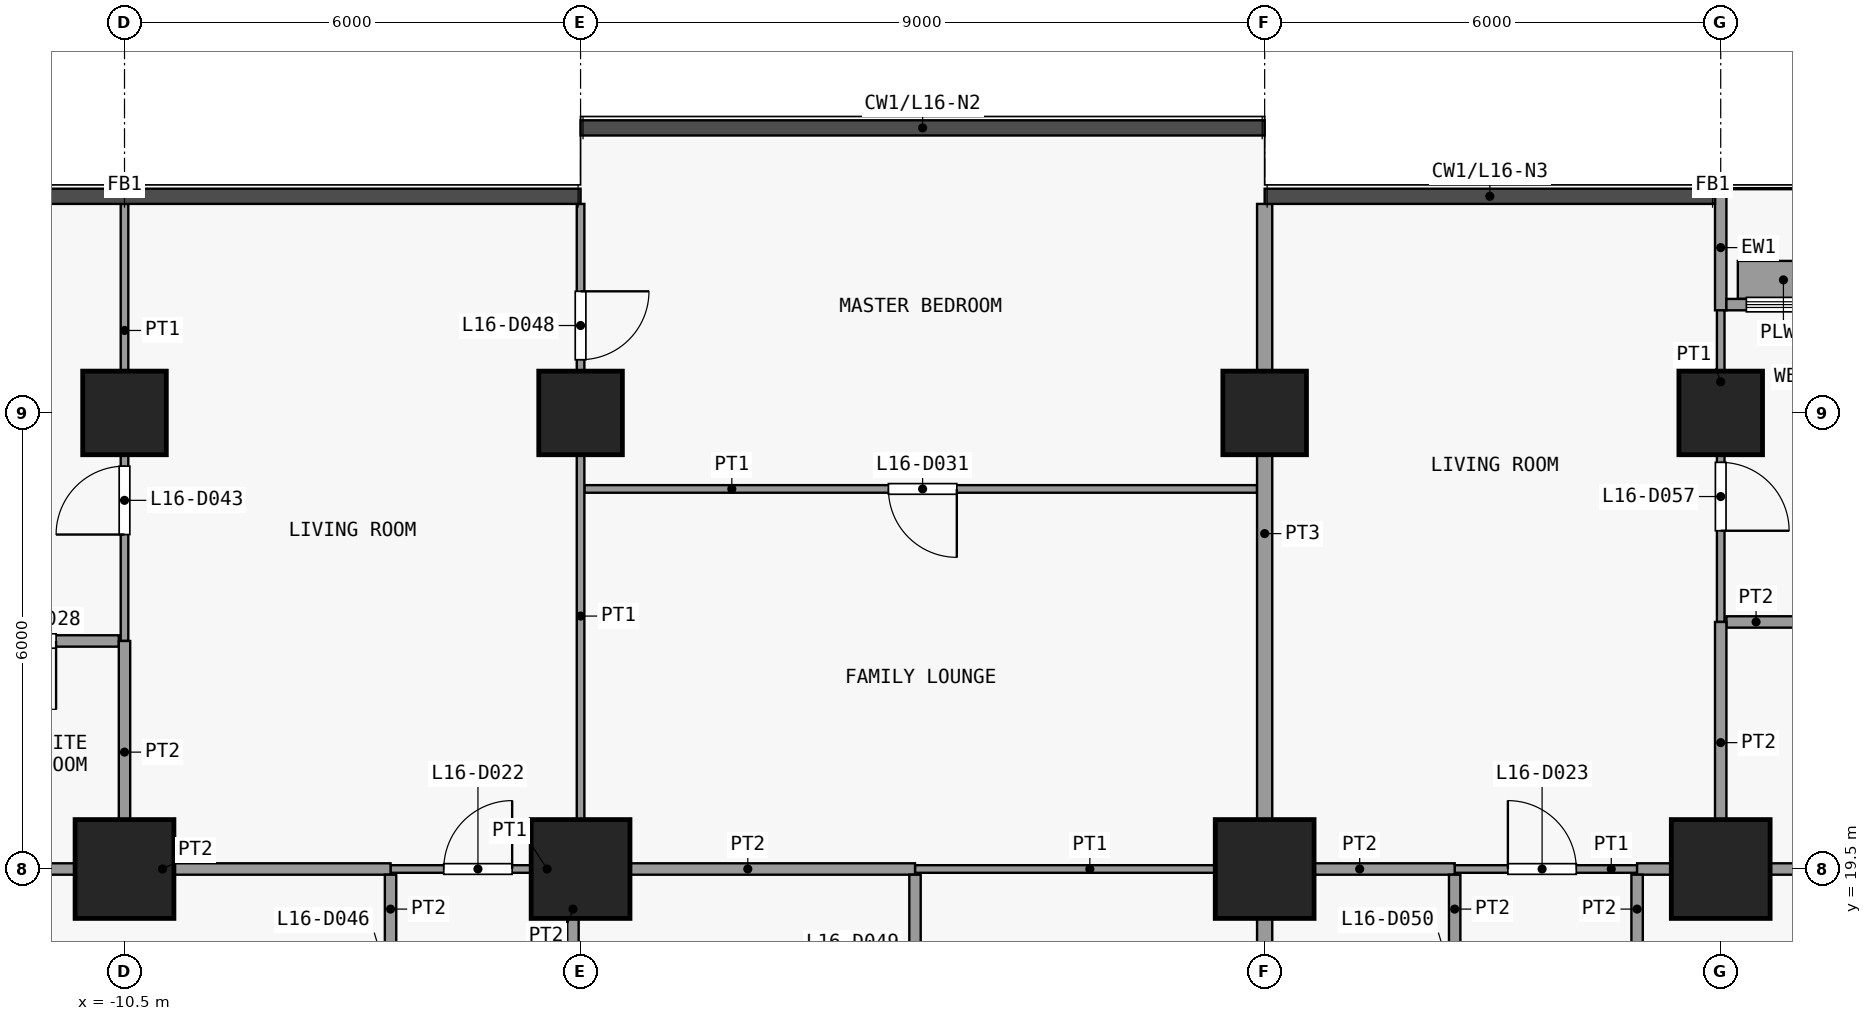
"""IFC4 building model, lengths in metres.
Left out: names, types, materials, properties, quantities, classifications, styles, units other than length and angle.
Written with IfcOpenShell. Run it as: python <this file> out.ifc"""

import sys

from ifc_helpers import new_model, si_unit, direction, frame, frame_2d, origin, origin_2d, place, context, subcontext, project, spatial, rectangle, extrude, element, fill, save


model = new_model("IFC4")
c1 = context("Model", 3, precision=1e-05, world=origin(), true_north=direction((0.0, 1.0)))
c2 = subcontext(c1, "Body", "Model", "MODEL_VIEW")
j1 = project(units=[si_unit("LENGTHUNIT", "METRE"), si_unit("PLANEANGLEUNIT", "RADIAN")], contexts=[c1])
p1 = place(None, origin())
s1 = spatial("IfcSite", under=j1, at=p1, CompositionType="ELEMENT")
p2 = place(p1, origin())
s2 = spatial("IfcBuilding", under=s1, at=p2, CompositionType="ELEMENT")
p3 = place(p2, frame((0.0, 0.0, 68.5)))
s3 = spatial("IfcBuildingStorey", under=s2, at=p3, CompositionType="ELEMENT", Elevation=68.5)
p4 = place(p3, frame((-10.5, 19.5, 0.0), z_axis=(0.0, 0.0, 1.0), x_axis=(1.0, 0.0, 0.0)))
e1 = element("IfcColumn", 1, at=p4, inside=s3, PredefinedType="COLUMN", context=c2, shape_type="SweptSolid", body=[
    extrude(rectangle(XDim=1.3, YDim=1.3, at=origin_2d()), origin(), (0.0, 0.0, 1.0), 3.6),
])
p5 = place(p3, frame((-10.5, 25.5, 0.0), z_axis=(0.0, 0.0, 1.0), x_axis=(1.0, 0.0, 0.0)))
e2 = element("IfcColumn", 2, at=p5, inside=s3, PredefinedType="COLUMN", context=c2, shape_type="SweptSolid", body=[
    extrude(rectangle(XDim=1.1, YDim=1.1, at=origin_2d()), origin(), (0.0, 0.0, 1.0), 3.6),
])
p6 = place(p3, frame((-4.5, 19.5, 0.0), z_axis=(0.0, 0.0, 1.0), x_axis=(1.0, 0.0, 0.0)))
e3 = element("IfcColumn", 3, at=p6, inside=s3, PredefinedType="COLUMN", context=c2, shape_type="SweptSolid", body=[
    extrude(rectangle(XDim=1.3, YDim=1.3, at=origin_2d()), origin(), (0.0, 0.0, 1.0), 3.6),
])
p7 = place(p3, frame((-4.5, 25.5, 0.0), z_axis=(0.0, 0.0, 1.0), x_axis=(1.0, 0.0, 0.0)))
e4 = element("IfcColumn", 4, at=p7, inside=s3, PredefinedType="COLUMN", context=c2, shape_type="SweptSolid", body=[
    extrude(rectangle(XDim=1.1, YDim=1.1, at=origin_2d()), origin(), (0.0, 0.0, 1.0), 3.6),
])
p8 = place(p3, frame((4.5, 19.5, 0.0), z_axis=(0.0, 0.0, 1.0), x_axis=(1.0, 0.0, 0.0)))
e5 = element("IfcColumn", 5, at=p8, inside=s3, PredefinedType="COLUMN", context=c2, shape_type="SweptSolid", body=[
    extrude(rectangle(XDim=1.3, YDim=1.3, at=origin_2d()), origin(), (0.0, 0.0, 1.0), 3.6),
])
p9 = place(p3, frame((4.5, 25.5, 0.0), z_axis=(0.0, 0.0, 1.0), x_axis=(1.0, 0.0, 0.0)))
e6 = element("IfcColumn", 6, at=p9, inside=s3, PredefinedType="COLUMN", context=c2, shape_type="SweptSolid", body=[
    extrude(rectangle(XDim=1.1, YDim=1.1, at=origin_2d()), origin(), (0.0, 0.0, 1.0), 3.6),
])
p10 = place(p3, frame((10.5, 19.5, 0.0), z_axis=(0.0, 0.0, 1.0), x_axis=(1.0, 0.0, 0.0)))
e7 = element("IfcColumn", 7, at=p10, inside=s3, PredefinedType="COLUMN", context=c2, shape_type="SweptSolid", body=[
    extrude(rectangle(XDim=1.3, YDim=1.3, at=origin_2d()), origin(), (0.0, 0.0, 1.0), 3.6),
])
p11 = place(p3, frame((10.5, 25.5, 0.0), z_axis=(0.0, 0.0, 1.0), x_axis=(1.0, 0.0, 0.0)))
e8 = element("IfcColumn", 8, at=p11, inside=s3, PredefinedType="COLUMN", context=c2, shape_type="SweptSolid", body=[
    extrude(rectangle(XDim=1.1, YDim=1.1, at=origin_2d()), origin(), (0.0, 0.0, 1.0), 3.6),
])
p12 = place(p3, frame((10.5, 26.85, 0.0), z_axis=(0.0, 0.0, 1.0), x_axis=(0.0, 1.0, 0.0)))
e9 = element("IfcWall", 9, at=p12, inside=s3, PredefinedType="SOLIDWALL", context=c2, shape_type="SweptSolid", body=[
    extrude(rectangle(XDim=1.65, YDim=0.15, at=frame_2d((0.825, 0.0))), origin(), (0.0, 0.0, 1.0), 3.3),
])
p13 = place(p3, frame((10.575, 26.925, 0.0), z_axis=(0.0, 0.0, 1.0), x_axis=(1.0, 0.0, 0.0)))
e10 = element("IfcWall", 10, at=p13, inside=s3, PredefinedType="SOLIDWALL", context=c2, shape_type="SweptSolid", body=[
    extrude(rectangle(XDim=5.85, YDim=0.15, at=frame_2d((2.925, 0.0))), origin(), (0.0, 0.0, 1.0), 3.3),
])
p14 = place(p13, frame((2.325, 0.0, 0.0)))
e11 = element("IfcOpeningElement", 11, at=p14, cuts=e10, PredefinedType="OPENING", context=c2, shape_type="SweptSolid", body=[
    extrude(rectangle(XDim=1.2, YDim=2.4, at=frame_2d((0.6, 1.2))), frame((0.0, 0.085, 0.0), z_axis=(0.0, -1.0, 0.0), x_axis=(1.0, 0.0, 0.0)), (0.0, 0.0, 1.0), 0.17),
])
p15 = place(p13, frame((0.262, 0.0, 0.9)))
e12 = element("IfcOpeningElement", 12, at=p15, cuts=e10, PredefinedType="OPENING", context=c2, shape_type="SweptSolid", body=[
    extrude(rectangle(XDim=1.8, YDim=2.1, at=frame_2d((0.9, 1.05))), frame((0.0, 0.085, 0.0), z_axis=(0.0, -1.0, 0.0), x_axis=(1.0, 0.0, 0.0)), (0.0, 0.0, 1.0), 0.17),
])
p16 = place(p13, frame((3.788, 0.0, 0.9)))
e13 = element("IfcOpeningElement", 13, at=p16, cuts=e10, PredefinedType="OPENING", context=c2, shape_type="SweptSolid", body=[
    extrude(rectangle(XDim=1.8, YDim=2.1, at=frame_2d((0.9, 1.05))), frame((0.0, 0.085, 0.0), z_axis=(0.0, -1.0, 0.0), x_axis=(1.0, 0.0, 0.0)), (0.0, 0.0, 1.0), 0.17),
])
p17 = place(p3, frame((10.725, 27.25, 0.0), z_axis=(0.0, 0.0, 1.0), x_axis=(1.0, 0.0, 0.0)))
e14 = element("IfcWall", 14, at=p17, inside=s3, PredefinedType="USERDEFINED", context=c2, shape_type="SweptSolid", body=[
    extrude(rectangle(XDim=1.2, YDim=0.5, at=frame_2d((0.6, 0.0))), origin(), (0.0, 0.0, 1.0), 0.9),
])
p18 = place(p3, frame((-7.0, 19.5, 0.0), z_axis=(0.0, 0.0, 1.0), x_axis=(1.0, 0.0, 0.0)))
e15 = element("IfcWall", 15, at=p18, inside=s3, PredefinedType="PARTITIONING", context=c2, shape_type="SweptSolid", body=[
    extrude(rectangle(XDim=2.4, YDim=0.1, at=frame_2d((1.2, 0.0))), origin(), (0.0, 0.0, 1.0), 3.3),
])
p19 = place(p18, frame((0.7, 0.0, 0.0)))
e16 = element("IfcOpeningElement", 16, at=p19, cuts=e15, PredefinedType="OPENING", context=c2, shape_type="SweptSolid", body=[
    extrude(rectangle(XDim=0.9, YDim=2.1, at=frame_2d((0.45, 1.05))), frame((0.0, 0.06, 0.0), z_axis=(0.0, -1.0, 0.0), x_axis=(1.0, 0.0, 0.0)), (0.0, 0.0, 1.0), 0.12),
])
p20 = place(p3, frame((-0.1, 19.5, 0.0), z_axis=(0.0, 0.0, 1.0), x_axis=(1.0, 0.0, 0.0)))
e17 = element("IfcWall", 17, at=p20, inside=s3, PredefinedType="PARTITIONING", context=c2, shape_type="SweptSolid", body=[
    extrude(rectangle(XDim=4.6, YDim=0.1, at=frame_2d((2.3, 0.0))), origin(), (0.0, 0.0, 1.0), 3.3),
])
p21 = place(p3, frame((7.0, 19.5, 0.0), z_axis=(0.0, 0.0, 1.0), x_axis=(1.0, 0.0, 0.0)))
e18 = element("IfcWall", 18, at=p21, inside=s3, PredefinedType="PARTITIONING", context=c2, shape_type="SweptSolid", body=[
    extrude(rectangle(XDim=2.4, YDim=0.1, at=frame_2d((1.2, 0.0))), origin(), (0.0, 0.0, 1.0), 3.3),
])
p22 = place(p21, frame((0.7, 0.0, 0.0)))
e19 = element("IfcOpeningElement", 19, at=p22, cuts=e18, PredefinedType="OPENING", context=c2, shape_type="SweptSolid", body=[
    extrude(rectangle(XDim=0.9, YDim=2.1, at=frame_2d((0.45, 1.05))), frame((0.0, 0.06, 0.0), z_axis=(0.0, -1.0, 0.0), x_axis=(1.0, 0.0, 0.0)), (0.0, 0.0, 1.0), 0.12),
])
p23 = place(p3, frame((-13.0, 19.5, 0.0), z_axis=(0.0, 0.0, 1.0), x_axis=(1.0, 0.0, 0.0)))
e20 = element("IfcWall", 20, at=p23, inside=s3, PredefinedType="PARTITIONING", context=c2, shape_type="SweptSolid", body=[
    extrude(rectangle(XDim=6.0, YDim=0.15, at=frame_2d((3.0, 0.0))), origin(), (0.0, 0.0, 1.0), 3.3),
])
p24 = place(p3, frame((-4.5, 19.5, 0.0), z_axis=(0.0, 0.0, 1.0), x_axis=(1.0, 0.0, 0.0)))
e21 = element("IfcWall", 21, at=p24, inside=s3, PredefinedType="PARTITIONING", context=c2, shape_type="SweptSolid", body=[
    extrude(rectangle(XDim=4.4, YDim=0.15, at=frame_2d((2.2, 0.0))), origin(), (0.0, 0.0, 1.0), 3.3),
])
p25 = place(p3, frame((4.5, 19.5, 0.0), z_axis=(0.0, 0.0, 1.0), x_axis=(1.0, 0.0, 0.0)))
e22 = element("IfcWall", 22, at=p25, inside=s3, PredefinedType="PARTITIONING", context=c2, shape_type="SweptSolid", body=[
    extrude(rectangle(XDim=2.5, YDim=0.15, at=frame_2d((1.25, 0.0))), origin(), (0.0, 0.0, 1.0), 3.3),
])
p26 = place(p3, frame((9.4, 19.5, 0.0), z_axis=(0.0, 0.0, 1.0), x_axis=(1.0, 0.0, 0.0)))
e23 = element("IfcWall", 23, at=p26, inside=s3, PredefinedType="PARTITIONING", context=c2, shape_type="SweptSolid", body=[
    extrude(rectangle(XDim=9.6, YDim=0.15, at=frame_2d((4.8, 0.0))), origin(), (0.0, 0.0, 1.0), 3.3),
])
p27 = place(p3, frame((-13.2, 22.5, 0.0), z_axis=(0.0, 0.0, 1.0), x_axis=(1.0, 0.0, 0.0)))
e24 = element("IfcWall", 24, at=p27, inside=s3, PredefinedType="PARTITIONING", context=c2, shape_type="SweptSolid", body=[
    extrude(rectangle(XDim=2.625, YDim=0.15, at=frame_2d((1.312, 0.0))), origin(), (0.0, 0.0, 1.0), 3.3),
])
p28 = place(p27, frame((0.9, 0.0, 0.0)))
e25 = element("IfcOpeningElement", 25, at=p28, cuts=e24, PredefinedType="OPENING", context=c2, shape_type="SweptSolid", body=[
    extrude(rectangle(XDim=0.9, YDim=2.1, at=frame_2d((0.45, 1.05))), frame((0.0, 0.085, 0.0), z_axis=(0.0, -1.0, 0.0), x_axis=(1.0, 0.0, 0.0)), (0.0, 0.0, 1.0), 0.17),
])
p29 = place(p3, frame((10.575, 22.75, 0.0), z_axis=(0.0, 0.0, 1.0), x_axis=(1.0, 0.0, 0.0)))
e26 = element("IfcWall", 26, at=p29, inside=s3, PredefinedType="PARTITIONING", context=c2, shape_type="SweptSolid", body=[
    extrude(rectangle(XDim=2.625, YDim=0.15, at=frame_2d((1.312, 0.0))), origin(), (0.0, 0.0, 1.0), 3.3),
])
p30 = place(p29, frame((0.9, 0.0, 0.0)))
e27 = element("IfcOpeningElement", 27, at=p30, cuts=e26, PredefinedType="OPENING", context=c2, shape_type="SweptSolid", body=[
    extrude(rectangle(XDim=0.9, YDim=2.1, at=frame_2d((0.45, 1.05))), frame((0.0, 0.085, 0.0), z_axis=(0.0, -1.0, 0.0), x_axis=(1.0, 0.0, 0.0)), (0.0, 0.0, 1.0), 0.17),
])
p31 = place(p3, frame((-4.45, 24.5, 0.0), z_axis=(0.0, 0.0, 1.0), x_axis=(1.0, 0.0, 0.0)))
e28 = element("IfcWall", 28, at=p31, inside=s3, PredefinedType="PARTITIONING", context=c2, shape_type="SweptSolid", body=[
    extrude(rectangle(XDim=8.85, YDim=0.1, at=frame_2d((4.425, 0.0))), origin(), (0.0, 0.0, 1.0), 3.3),
])
p32 = place(p31, frame((4.0, 0.0, 0.0)))
e29 = element("IfcOpeningElement", 29, at=p32, cuts=e28, PredefinedType="OPENING", context=c2, shape_type="SweptSolid", body=[
    extrude(rectangle(XDim=0.9, YDim=2.1, at=frame_2d((0.45, 1.05))), frame((0.0, 0.06, 0.0), z_axis=(0.0, -1.0, 0.0), x_axis=(1.0, 0.0, 0.0)), (0.0, 0.0, 1.0), 0.12),
])
p33 = place(p3, frame((-10.5, 22.5, 0.0), z_axis=(0.0, 0.0, 1.0), x_axis=(0.0, 1.0, 0.0)))
e30 = element("IfcWall", 30, at=p33, inside=s3, PredefinedType="PARTITIONING", context=c2, shape_type="SweptSolid", body=[
    extrude(rectangle(XDim=5.75, YDim=0.1, at=frame_2d((2.875, 0.0))), origin(), (0.0, 0.0, 1.0), 3.3),
])
p34 = place(p33, frame((1.4, 0.0, 0.0)))
e31 = element("IfcOpeningElement", 31, at=p34, cuts=e30, PredefinedType="OPENING", context=c2, shape_type="SweptSolid", body=[
    extrude(rectangle(XDim=0.9, YDim=2.1, at=frame_2d((0.45, 1.05))), frame((0.0, 0.06, 0.0), z_axis=(0.0, -1.0, 0.0), x_axis=(1.0, 0.0, 0.0)), (0.0, 0.0, 1.0), 0.12),
])
p35 = place(p3, frame((-10.5, 19.575, 0.0), z_axis=(0.0, 0.0, 1.0), x_axis=(0.0, 1.0, 0.0)))
e32 = element("IfcWall", 32, at=p35, inside=s3, PredefinedType="PARTITIONING", context=c2, shape_type="SweptSolid", body=[
    extrude(rectangle(XDim=2.925, YDim=0.15, at=frame_2d((1.462, 0.0))), origin(), (0.0, 0.0, 1.0), 3.3),
])
p36 = place(p3, frame((-7.0, 16.6, 0.0), z_axis=(0.0, 0.0, 1.0), x_axis=(0.0, 1.0, 0.0)))
e33 = element("IfcWall", 33, at=p36, inside=s3, PredefinedType="PARTITIONING", context=c2, shape_type="SweptSolid", body=[
    extrude(rectangle(XDim=2.825, YDim=0.15, at=frame_2d((1.413, 0.0))), origin(), (0.0, 0.0, 1.0), 3.3),
])
p37 = place(p36, frame((0.9, 0.0, 0.0)))
e34 = element("IfcOpeningElement", 34, at=p37, cuts=e33, PredefinedType="OPENING", context=c2, shape_type="SweptSolid", body=[
    extrude(rectangle(XDim=0.9, YDim=2.1, at=frame_2d((0.45, 1.05))), frame((0.0, 0.085, 0.0), z_axis=(0.0, -1.0, 0.0), x_axis=(1.0, 0.0, 0.0)), (0.0, 0.0, 1.0), 0.17),
])
p38 = place(p3, frame((-4.6, 16.6, 0.0), z_axis=(0.0, 0.0, 1.0), x_axis=(0.0, 1.0, 0.0)))
e35 = element("IfcWall", 35, at=p38, inside=s3, PredefinedType="PARTITIONING", context=c2, shape_type="SweptSolid", body=[
    extrude(rectangle(XDim=2.825, YDim=0.15, at=frame_2d((1.413, 0.0))), origin(), (0.0, 0.0, 1.0), 3.3),
])
p39 = place(p38, frame((0.9, 0.0, 0.0)))
e36 = element("IfcOpeningElement", 36, at=p39, cuts=e35, PredefinedType="OPENING", context=c2, shape_type="SweptSolid", body=[
    extrude(rectangle(XDim=0.9, YDim=2.1, at=frame_2d((0.45, 1.05))), frame((0.0, 0.085, 0.0), z_axis=(0.0, -1.0, 0.0), x_axis=(1.0, 0.0, 0.0)), (0.0, 0.0, 1.0), 0.17),
])
p40 = place(p3, frame((-4.5, 19.575, 0.0), z_axis=(0.0, 0.0, 1.0), x_axis=(0.0, 1.0, 0.0)))
e37 = element("IfcWall", 37, at=p40, inside=s3, PredefinedType="PARTITIONING", context=c2, shape_type="SweptSolid", body=[
    extrude(rectangle(XDim=8.675, YDim=0.1, at=frame_2d((4.337, 0.0))), origin(), (0.0, 0.0, 1.0), 3.3),
])
p41 = place(p40, frame((6.625, 0.0, 0.0)))
e38 = element("IfcOpeningElement", 38, at=p41, cuts=e37, PredefinedType="OPENING", context=c2, shape_type="SweptSolid", body=[
    extrude(rectangle(XDim=0.9, YDim=2.1, at=frame_2d((0.45, 1.05))), frame((0.0, 0.06, 0.0), z_axis=(0.0, -1.0, 0.0), x_axis=(1.0, 0.0, 0.0)), (0.0, 0.0, 1.0), 0.12),
])
p42 = place(p3, frame((-0.1, 16.6, 0.0), z_axis=(0.0, 0.0, 1.0), x_axis=(0.0, 1.0, 0.0)))
e39 = element("IfcWall", 39, at=p42, inside=s3, PredefinedType="PARTITIONING", context=c2, shape_type="SweptSolid", body=[
    extrude(rectangle(XDim=2.825, YDim=0.15, at=frame_2d((1.413, 0.0))), origin(), (0.0, 0.0, 1.0), 3.3),
])
p43 = place(p42, frame((1.0, 0.0, 0.0)))
e40 = element("IfcOpeningElement", 40, at=p43, cuts=e39, PredefinedType="OPENING", context=c2, shape_type="SweptSolid", body=[
    extrude(rectangle(XDim=0.9, YDim=2.1, at=frame_2d((0.45, 1.05))), frame((0.0, 0.085, 0.0), z_axis=(0.0, -1.0, 0.0), x_axis=(1.0, 0.0, 0.0)), (0.0, 0.0, 1.0), 0.17),
])
p44 = place(p3, frame((4.5, 16.6, 0.0), z_axis=(0.0, 0.0, 1.0), x_axis=(0.0, 1.0, 0.0)))
e41 = element("IfcWall", 41, at=p44, inside=s3, PredefinedType="PARTITIONING", context=c2, shape_type="SweptSolid", body=[
    extrude(rectangle(XDim=2.825, YDim=0.2, at=frame_2d((1.413, 0.0))), origin(), (0.0, 0.0, 1.0), 3.3),
])
p45 = place(p3, frame((4.5, 19.575, 0.0), z_axis=(0.0, 0.0, 1.0), x_axis=(0.0, 1.0, 0.0)))
e42 = element("IfcWall", 42, at=p45, inside=s3, PredefinedType="PARTITIONING", context=c2, shape_type="SweptSolid", body=[
    extrude(rectangle(XDim=8.675, YDim=0.2, at=frame_2d((4.337, 0.0))), origin(), (0.0, 0.0, 1.0), 3.3),
])
p46 = place(p3, frame((7.0, 16.6, 0.0), z_axis=(0.0, 0.0, 1.0), x_axis=(0.0, 1.0, 0.0)))
e43 = element("IfcWall", 43, at=p46, inside=s3, PredefinedType="PARTITIONING", context=c2, shape_type="SweptSolid", body=[
    extrude(rectangle(XDim=2.825, YDim=0.15, at=frame_2d((1.413, 0.0))), origin(), (0.0, 0.0, 1.0), 3.3),
])
p47 = place(p46, frame((0.9, 0.0, 0.0)))
e44 = element("IfcOpeningElement", 44, at=p47, cuts=e43, PredefinedType="OPENING", context=c2, shape_type="SweptSolid", body=[
    extrude(rectangle(XDim=0.9, YDim=2.1, at=frame_2d((0.45, 1.05))), frame((0.0, 0.085, 0.0), z_axis=(0.0, -1.0, 0.0), x_axis=(1.0, 0.0, 0.0)), (0.0, 0.0, 1.0), 0.17),
])
p48 = place(p3, frame((9.4, 16.6, 0.0), z_axis=(0.0, 0.0, 1.0), x_axis=(0.0, 1.0, 0.0)))
e45 = element("IfcWall", 45, at=p48, inside=s3, PredefinedType="PARTITIONING", context=c2, shape_type="SweptSolid", body=[
    extrude(rectangle(XDim=2.825, YDim=0.15, at=frame_2d((1.413, 0.0))), origin(), (0.0, 0.0, 1.0), 3.3),
])
p49 = place(p48, frame((0.9, 0.0, 0.0)))
e46 = element("IfcOpeningElement", 46, at=p49, cuts=e45, PredefinedType="OPENING", context=c2, shape_type="SweptSolid", body=[
    extrude(rectangle(XDim=0.9, YDim=2.1, at=frame_2d((0.45, 1.05))), frame((0.0, 0.085, 0.0), z_axis=(0.0, -1.0, 0.0), x_axis=(1.0, 0.0, 0.0)), (0.0, 0.0, 1.0), 0.17),
])
p50 = place(p3, frame((10.5, 22.75, 0.0), z_axis=(0.0, 0.0, 1.0), x_axis=(0.0, 1.0, 0.0)))
e47 = element("IfcWall", 47, at=p50, inside=s3, PredefinedType="PARTITIONING", context=c2, shape_type="SweptSolid", body=[
    extrude(rectangle(XDim=4.1, YDim=0.1, at=frame_2d((2.05, 0.0))), origin(), (0.0, 0.0, 1.0), 3.3),
])
p51 = place(p50, frame((1.2, 0.0, 0.0)))
e48 = element("IfcOpeningElement", 48, at=p51, cuts=e47, PredefinedType="OPENING", context=c2, shape_type="SweptSolid", body=[
    extrude(rectangle(XDim=0.9, YDim=2.1, at=frame_2d((0.45, 1.05))), frame((0.0, 0.06, 0.0), z_axis=(0.0, -1.0, 0.0), x_axis=(1.0, 0.0, 0.0)), (0.0, 0.0, 1.0), 0.12),
])
p52 = place(p3, frame((10.5, 19.575, 0.0), z_axis=(0.0, 0.0, 1.0), x_axis=(0.0, 1.0, 0.0)))
e49 = element("IfcWall", 49, at=p52, inside=s3, PredefinedType="PARTITIONING", context=c2, shape_type="SweptSolid", body=[
    extrude(rectangle(XDim=3.175, YDim=0.15, at=frame_2d((1.587, 0.0))), origin(), (0.0, 0.0, 1.0), 3.3),
])
p53 = place(p15, origin())
e50 = element("IfcWindow", 50, at=p53, inside=s3, PartitioningType="SINGLE_PANEL", PredefinedType="WINDOW", context=c2, shape_type="SweptSolid", body=[
    extrude(rectangle(XDim=1.8, YDim=2.1, at=frame_2d((0.9, 1.05))), frame((0.0, 0.03, 0.0), z_axis=(0.0, -1.0, 0.0), x_axis=(1.0, 0.0, 0.0)), (0.0, 0.0, 1.0), 0.06),
])
fill(e12, e50)
p54 = place(p19, origin())
e51 = element("IfcDoor", 51, at=p54, inside=s3, OperationType="SINGLE_SWING_LEFT", PredefinedType="DOOR", context=c2, shape_type="SweptSolid", body=[
    extrude(rectangle(XDim=0.9, YDim=2.1, at=frame_2d((0.45, 1.05))), frame((0.0, 0.025, 0.0), z_axis=(0.0, -1.0, 0.0), x_axis=(1.0, 0.0, 0.0)), (0.0, 0.0, 1.0), 0.05),
])
fill(e16, e51)
p55 = place(p22, origin())
e52 = element("IfcDoor", 52, at=p55, inside=s3, OperationType="SINGLE_SWING_RIGHT", PredefinedType="DOOR", context=c2, shape_type="SweptSolid", body=[
    extrude(rectangle(XDim=0.9, YDim=2.1, at=frame_2d((0.45, 1.05))), frame((0.0, 0.025, 0.0), z_axis=(0.0, -1.0, 0.0), x_axis=(1.0, 0.0, 0.0)), (0.0, 0.0, 1.0), 0.05),
])
fill(e19, e52)
p56 = place(p28, origin())
e53 = element("IfcDoor", 53, at=p56, inside=s3, OperationType="SINGLE_SWING_RIGHT", PredefinedType="DOOR", context=c2, shape_type="SweptSolid", body=[
    extrude(rectangle(XDim=0.9, YDim=2.1, at=frame_2d((0.45, 1.05))), frame((0.0, 0.025, 0.0), z_axis=(0.0, -1.0, 0.0), x_axis=(1.0, 0.0, 0.0)), (0.0, 0.0, 1.0), 0.05),
])
fill(e25, e53)
p57 = place(p32, origin())
e54 = element("IfcDoor", 54, at=p57, inside=s3, OperationType="SINGLE_SWING_RIGHT", PredefinedType="DOOR", context=c2, shape_type="SweptSolid", body=[
    extrude(rectangle(XDim=0.9, YDim=2.1, at=frame_2d((0.45, 1.05))), frame((0.0, 0.025, 0.0), z_axis=(0.0, -1.0, 0.0), x_axis=(1.0, 0.0, 0.0)), (0.0, 0.0, 1.0), 0.05),
])
fill(e29, e54)
p58 = place(p34, origin())
e55 = element("IfcDoor", 55, at=p58, inside=s3, OperationType="SINGLE_SWING_RIGHT", PredefinedType="DOOR", context=c2, shape_type="SweptSolid", body=[
    extrude(rectangle(XDim=0.9, YDim=2.1, at=frame_2d((0.45, 1.05))), frame((0.0, 0.025, 0.0), z_axis=(0.0, -1.0, 0.0), x_axis=(1.0, 0.0, 0.0)), (0.0, 0.0, 1.0), 0.05),
])
fill(e31, e55)
p59 = place(p41, origin())
e56 = element("IfcDoor", 56, at=p59, inside=s3, OperationType="SINGLE_SWING_RIGHT", PredefinedType="DOOR", context=c2, shape_type="SweptSolid", body=[
    extrude(rectangle(XDim=0.9, YDim=2.1, at=frame_2d((0.45, 1.05))), frame((0.0, 0.025, 0.0), z_axis=(0.0, -1.0, 0.0), x_axis=(1.0, 0.0, 0.0)), (0.0, 0.0, 1.0), 0.05),
])
fill(e38, e56)
p60 = place(p51, origin())
e57 = element("IfcDoor", 57, at=p60, inside=s3, OperationType="SINGLE_SWING_LEFT", PredefinedType="DOOR", context=c2, shape_type="SweptSolid", body=[
    extrude(rectangle(XDim=0.9, YDim=2.1, at=frame_2d((0.45, 1.05))), frame((0.0, 0.025, 0.0), z_axis=(0.0, -1.0, 0.0), x_axis=(1.0, 0.0, 0.0)), (0.0, 0.0, 1.0), 0.05),
])
fill(e48, e57)
save(model, sys.argv[1])
